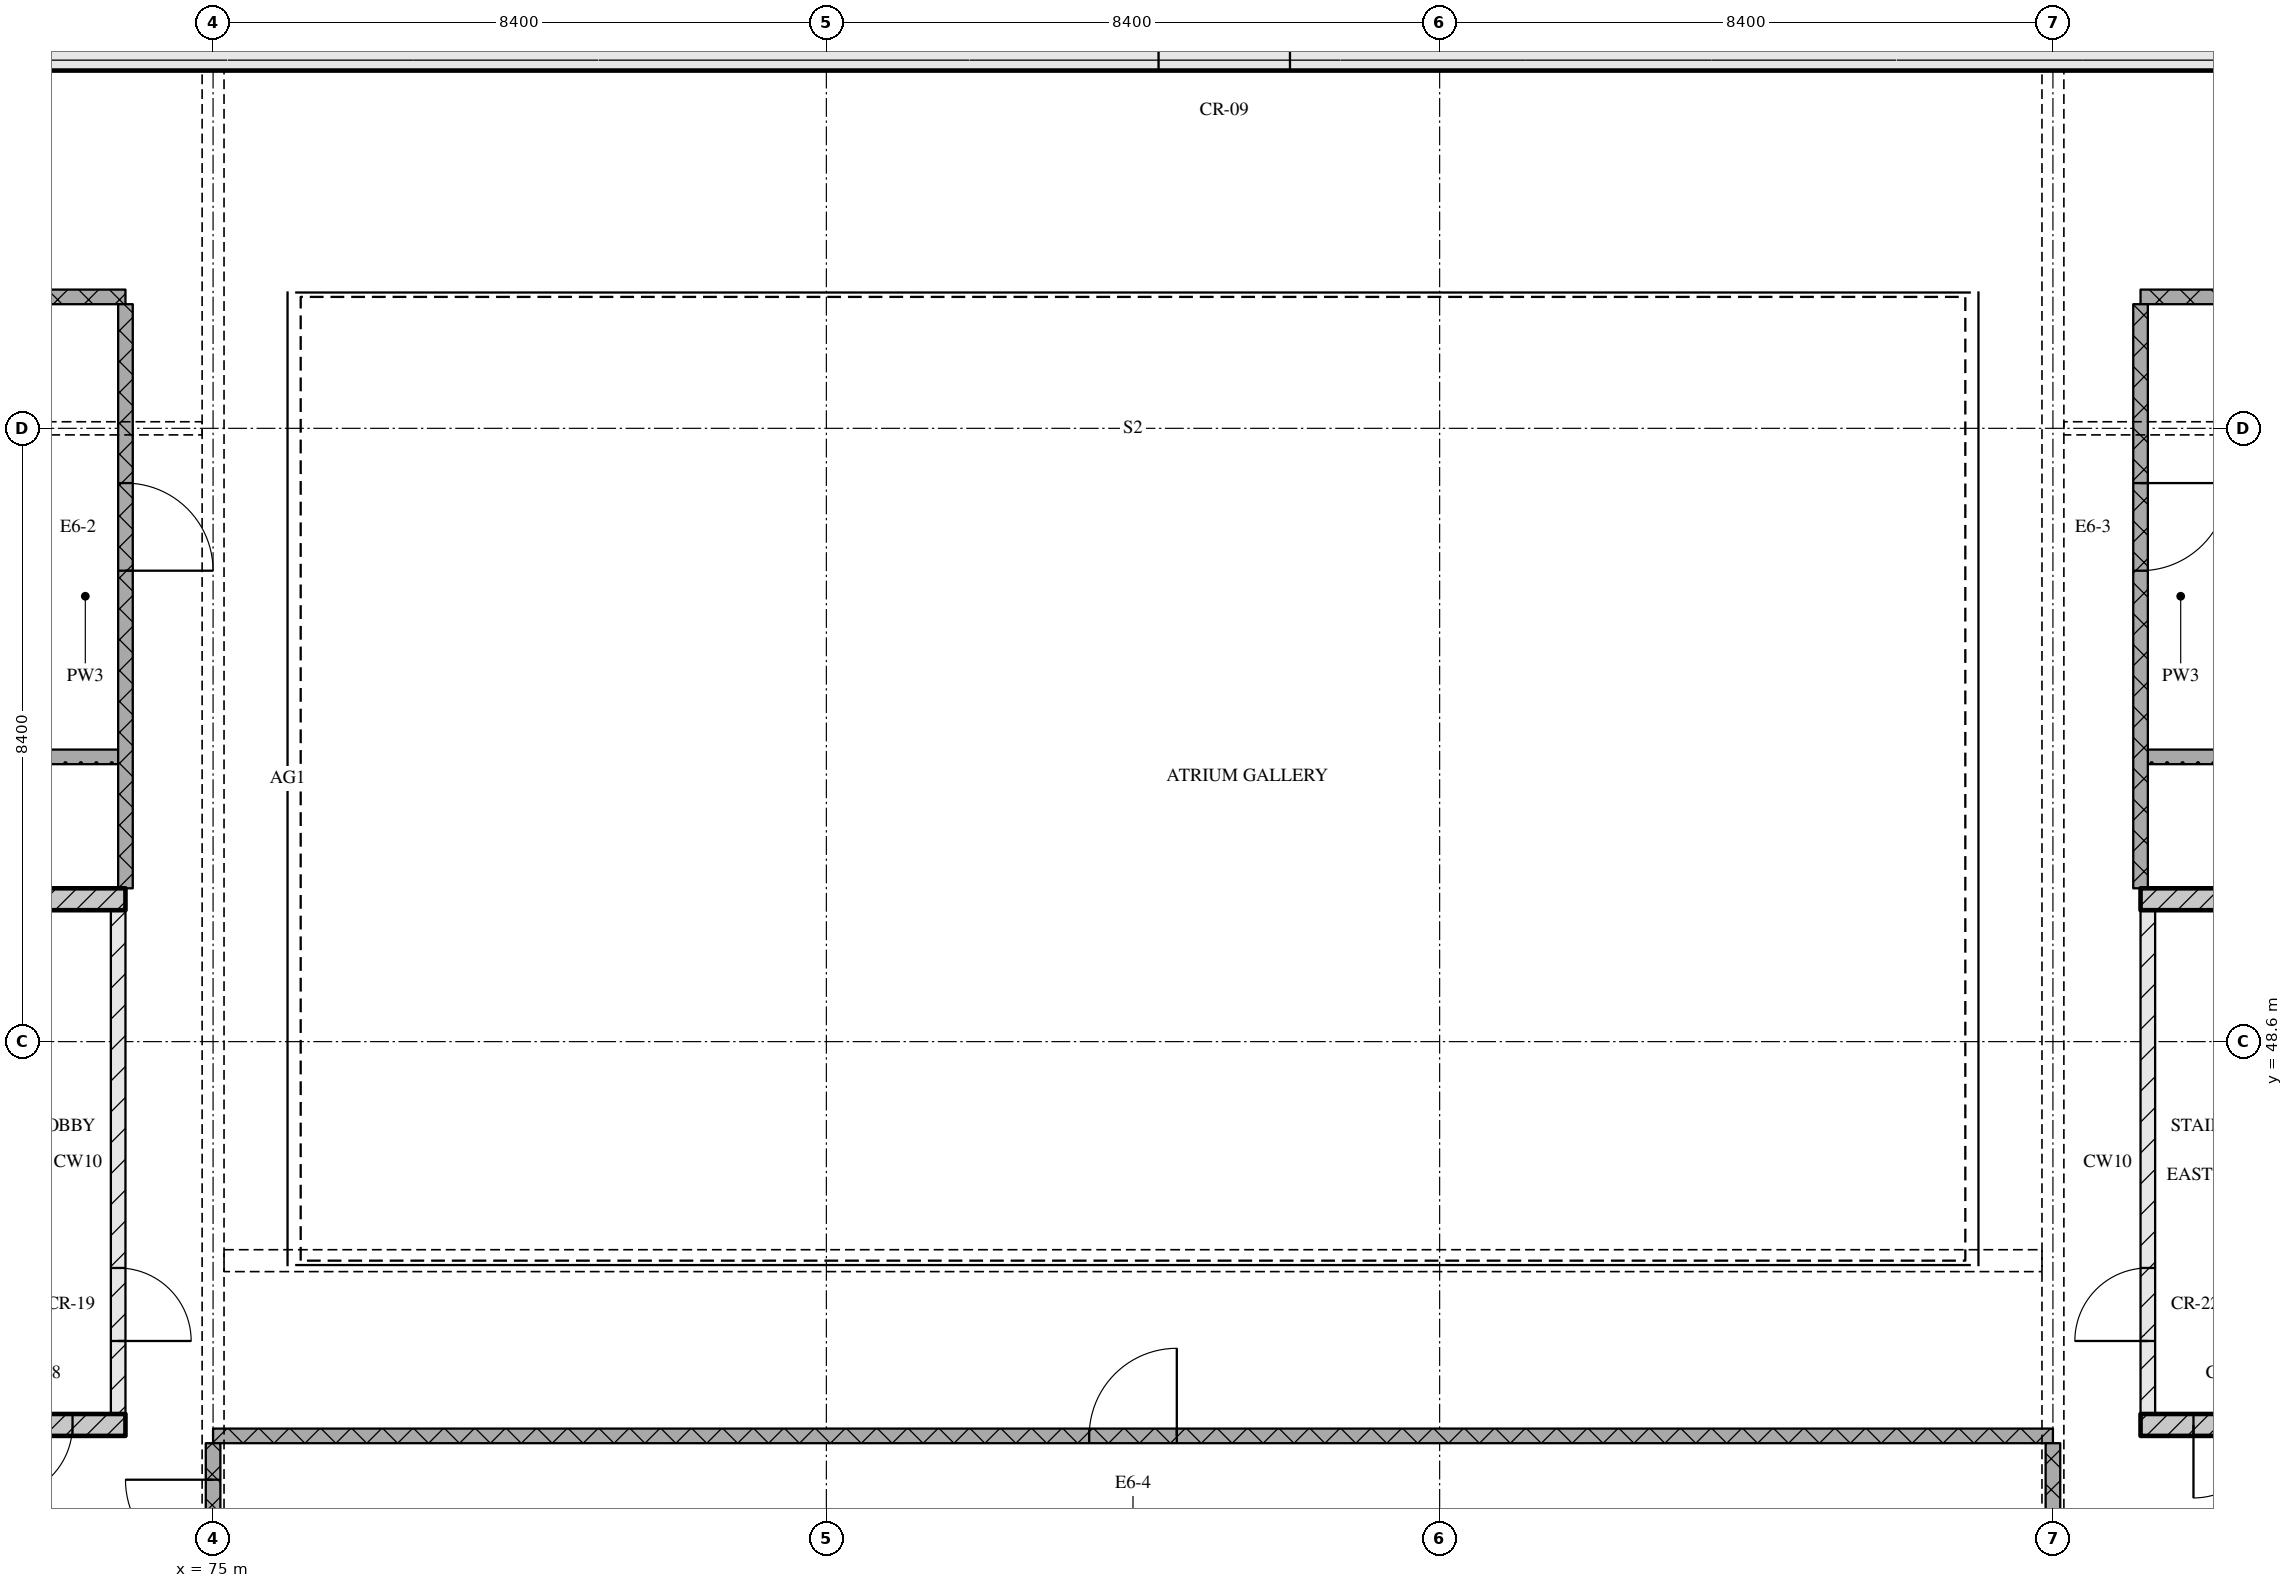
"""IFC4 building model, lengths in metres.
Left out: names, types, materials, properties, quantities, classifications, styles, units other than length and angle.
Written with IfcOpenShell. Run it as: python <this file> out.ifc"""

import sys

from ifc_helpers import new_model, si_unit, direction, frame, frame_2d, origin, place, context, subcontext, project, spatial, rectangle, extrude, element, fill, save


model = new_model("IFC4")
c1 = context("Model", 3, precision=1e-05, world=origin(), true_north=direction((0.0, 1.0)))
c2 = subcontext(c1, "Body", "Model", "MODEL_VIEW")
j1 = project(units=[si_unit("LENGTHUNIT", "METRE"), si_unit("PLANEANGLEUNIT", "RADIAN")], contexts=[c1])
p1 = place(None, origin())
s1 = spatial("IfcSite", under=j1, at=p1, CompositionType="ELEMENT")
p2 = place(p1, origin())
s2 = spatial("IfcBuilding", under=s1, at=p2, CompositionType="ELEMENT")
p3 = place(p2, frame((0.0, 0.0, 303.15)))
s3 = spatial("IfcBuildingStorey", under=s2, at=p3, CompositionType="ELEMENT", Elevation=303.15)
p4 = place(p3, frame((67.3, 62.15, 0.0), z_axis=(0.0, 0.0, 1.0), x_axis=(1.0, 0.0, 0.0)))
e1 = element("IfcWall", 1, at=p4, inside=s3, PredefinedType="SOLIDWALL", context=c2, shape_type="SweptSolid", body=[
    extrude(rectangle(XDim=40.6, YDim=0.5, at=frame_2d((20.3, 0.0))), origin(), (0.0, 0.0, 1.0), 3.32),
])
p5 = place(p4, frame((20.65, 0.0, 0.0)))
e2 = element("IfcOpeningElement", 2, at=p5, cuts=e1, PredefinedType="OPENING", context=c2, shape_type="SweptSolid", body=[
    extrude(rectangle(XDim=1.8, YDim=2.1, at=frame_2d((0.9, 1.05))), frame((0.0, 0.26, 0.0), z_axis=(0.0, -1.0, 0.0), x_axis=(1.0, 0.0, 0.0)), (0.0, 0.0, 1.0), 0.52),
])
p6 = place(p3, frame((68.2, 43.35, 0.0), z_axis=(0.0, 0.0, 1.0), x_axis=(1.0, 0.0, 0.0)))
e3 = element("IfcWall", 3, at=p6, inside=s3, PredefinedType="SOLIDWALL", context=c2, shape_type="SweptSolid", body=[
    extrude(rectangle(XDim=5.6, YDim=0.3, at=frame_2d((2.8, 0.0))), origin(), (0.0, 0.0, 1.0), 3.32),
])
p7 = place(p6, frame((3.875, 0.0, 0.0)))
e4 = element("IfcOpeningElement", 4, at=p7, cuts=e3, PredefinedType="OPENING", context=c2, shape_type="SweptSolid", body=[
    extrude(rectangle(XDim=1.0, YDim=2.1, at=frame_2d((0.5, 1.05))), frame((0.0, 0.16, 0.0), z_axis=(0.0, -1.0, 0.0), x_axis=(1.0, 0.0, 0.0)), (0.0, 0.0, 1.0), 0.32),
])
p8 = place(p3, frame((73.7, 43.5, 0.0), z_axis=(0.0, 0.0, 1.0), x_axis=(0.0, 1.0, 0.0)))
e5 = element("IfcWall", 5, at=p8, inside=s3, PredefinedType="PARTITIONING", context=c2, shape_type="SweptSolid", body=[
    extrude(rectangle(XDim=6.9, YDim=0.2, at=frame_2d((3.45, 0.0))), origin(), (0.0, 0.0, 1.0), 3.32),
])
p9 = place(p8, frame((1.0, 0.0, 0.0)))
e6 = element("IfcOpeningElement", 6, at=p9, cuts=e5, PredefinedType="OPENING", context=c2, shape_type="SweptSolid", body=[
    extrude(rectangle(XDim=1.0, YDim=2.1, at=frame_2d((0.5, 1.05))), frame((0.0, 0.11, 0.0), z_axis=(0.0, -1.0, 0.0), x_axis=(1.0, 0.0, 0.0)), (0.0, 0.0, 1.0), 0.22),
])
p10 = place(p3, frame((68.2, 50.55, 0.0), z_axis=(0.0, 0.0, 1.0), x_axis=(1.0, 0.0, 0.0)))
e7 = element("IfcWall", 7, at=p10, inside=s3, PredefinedType="SOLIDWALL", context=c2, shape_type="SweptSolid", body=[
    extrude(rectangle(XDim=5.6, YDim=0.3, at=frame_2d((2.8, 0.0))), origin(), (0.0, 0.0, 1.0), 3.32),
])
p11 = place(p3, frame((101.4, 43.35, 0.0), z_axis=(0.0, 0.0, 1.0), x_axis=(1.0, 0.0, 0.0)))
e8 = element("IfcWall", 8, at=p11, inside=s3, PredefinedType="SOLIDWALL", context=c2, shape_type="SweptSolid", body=[
    extrude(rectangle(XDim=5.6, YDim=0.3, at=frame_2d((2.8, 0.0))), origin(), (0.0, 0.0, 1.0), 3.32),
])
p12 = place(p11, frame((0.725, 0.0, 0.0)))
e9 = element("IfcOpeningElement", 9, at=p12, cuts=e8, PredefinedType="OPENING", context=c2, shape_type="SweptSolid", body=[
    extrude(rectangle(XDim=1.0, YDim=2.1, at=frame_2d((0.5, 1.05))), frame((0.0, 0.16, 0.0), z_axis=(0.0, -1.0, 0.0), x_axis=(1.0, 0.0, 0.0)), (0.0, 0.0, 1.0), 0.32),
])
p13 = place(p3, frame((101.5, 43.5, 0.0), z_axis=(0.0, 0.0, 1.0), x_axis=(0.0, 1.0, 0.0)))
e10 = element("IfcWall", 10, at=p13, inside=s3, PredefinedType="PARTITIONING", context=c2, shape_type="SweptSolid", body=[
    extrude(rectangle(XDim=6.9, YDim=0.2, at=frame_2d((3.45, 0.0))), origin(), (0.0, 0.0, 1.0), 3.32),
])
p14 = place(p13, frame((1.0, 0.0, 0.0)))
e11 = element("IfcOpeningElement", 11, at=p14, cuts=e10, PredefinedType="OPENING", context=c2, shape_type="SweptSolid", body=[
    extrude(rectangle(XDim=1.0, YDim=2.1, at=frame_2d((0.5, 1.05))), frame((0.0, 0.11, 0.0), z_axis=(0.0, -1.0, 0.0), x_axis=(1.0, 0.0, 0.0)), (0.0, 0.0, 1.0), 0.22),
])
p15 = place(p3, frame((101.4, 50.55, 0.0), z_axis=(0.0, 0.0, 1.0), x_axis=(1.0, 0.0, 0.0)))
e12 = element("IfcWall", 12, at=p15, inside=s3, PredefinedType="SOLIDWALL", context=c2, shape_type="SweptSolid", body=[
    extrude(rectangle(XDim=5.6, YDim=0.3, at=frame_2d((2.8, 0.0))), origin(), (0.0, 0.0, 1.0), 3.32),
])
p16 = place(p3, frame((100.2, 43.2, 0.0), z_axis=(0.0, 0.0, 1.0), x_axis=(-1.0, 0.0, 0.0)))
e13 = element("IfcWall", 13, at=p16, inside=s3, PredefinedType="PARTITIONING", context=c2, shape_type="SweptSolid", body=[
    extrude(rectangle(XDim=25.2, YDim=0.2, at=frame_2d((12.6, 0.0))), origin(), (0.0, 0.0, 1.0), 3.32),
])
p17 = place(p16, frame((12.0, 0.0, 0.0)))
e14 = element("IfcOpeningElement", 14, at=p17, cuts=e13, PredefinedType="OPENING", context=c2, shape_type="SweptSolid", body=[
    extrude(rectangle(XDim=1.2, YDim=2.1, at=frame_2d((0.6, 1.05))), frame((0.0, 0.11, 0.0), z_axis=(0.0, -1.0, 0.0), x_axis=(1.0, 0.0, 0.0)), (0.0, 0.0, 1.0), 0.22),
])
for number, where, z_axis, x_axis in (
    (15, (56.68, 52.5, 0.0), (0.0, 0.0, 1.0), (1.0, 0.0, 0.0)),
    (16, (101.5, 52.5, 0.0), (0.0, 0.0, 1.0), (1.0, 0.0, 0.0)),
):
    element("IfcWall", number, at=place(p3, frame(where, z_axis=z_axis, x_axis=x_axis)), inside=s3, PredefinedType="PARTITIONING", context=c2, shape_type="SweptSolid", body=[
        extrude(rectangle(XDim=17.02, YDim=0.2, at=frame_2d((8.51, 0.0))), origin(), (0.0, 0.0, 1.0), 3.32),
    ])
for number, where, z_axis, x_axis in (
    (17, (64.2, 58.8, 0.0), (0.0, 0.0, 1.0), (1.0, 0.0, 0.0)),
    (18, (101.4, 58.8, 0.0), (0.0, 0.0, 1.0), (1.0, 0.0, 0.0)),
):
    element("IfcWall", number, at=place(p3, frame(where, z_axis=z_axis, x_axis=x_axis)), inside=s3, PredefinedType="PARTITIONING", context=c2, shape_type="SweptSolid", body=[
        extrude(rectangle(XDim=9.6, YDim=0.2, at=frame_2d((4.8, 0.0))), origin(), (0.0, 0.0, 1.0), 3.32),
    ])
p18 = place(p3, frame((73.8, 50.7, 0.0), z_axis=(0.0, 0.0, 1.0), x_axis=(0.0, 1.0, 0.0)))
e19 = element("IfcWall", 19, at=p18, inside=s3, PredefinedType="PARTITIONING", context=c2, shape_type="SweptSolid", body=[
    extrude(rectangle(XDim=8.0, YDim=0.2, at=frame_2d((4.0, 0.0))), origin(), (0.0, 0.0, 1.0), 3.32),
])
p19 = place(p18, frame((4.35, 0.0, 0.0)))
e20 = element("IfcOpeningElement", 20, at=p19, cuts=e19, PredefinedType="OPENING", context=c2, shape_type="SweptSolid", body=[
    extrude(rectangle(XDim=1.2, YDim=2.1, at=frame_2d((0.6, 1.05))), frame((0.0, 0.11, 0.0), z_axis=(0.0, -1.0, 0.0), x_axis=(1.0, 0.0, 0.0)), (0.0, 0.0, 1.0), 0.22),
])
p20 = place(p3, frame((75.0, 43.1, 0.0), z_axis=(0.0, 0.0, 1.0), x_axis=(0.0, -1.0, 0.0)))
e21 = element("IfcWall", 21, at=p20, inside=s3, PredefinedType="PARTITIONING", context=c2, shape_type="SweptSolid", body=[
    extrude(rectangle(XDim=2.2, YDim=0.2, at=frame_2d((1.1, 0.0))), origin(), (0.0, 0.0, 1.0), 2.53),
])
p21 = place(p20, frame((0.5, 0.0, 0.0)))
e22 = element("IfcOpeningElement", 22, at=p21, cuts=e21, PredefinedType="OPENING", context=c2, shape_type="SweptSolid", body=[
    extrude(rectangle(XDim=1.2, YDim=2.1, at=frame_2d((0.6, 1.05))), frame((0.0, 0.11, 0.0), z_axis=(0.0, -1.0, 0.0), x_axis=(1.0, 0.0, 0.0)), (0.0, 0.0, 1.0), 0.22),
])
p22 = place(p3, frame((100.2, 43.1, 0.0), z_axis=(0.0, 0.0, 1.0), x_axis=(0.0, -1.0, 0.0)))
e23 = element("IfcWall", 23, at=p22, inside=s3, PredefinedType="PARTITIONING", context=c2, shape_type="SweptSolid", body=[
    extrude(rectangle(XDim=2.2, YDim=0.2, at=frame_2d((1.1, 0.0))), origin(), (0.0, 0.0, 1.0), 2.53),
])
p23 = place(p3, frame((101.4, 58.7, 0.0), z_axis=(0.0, 0.0, 1.0), x_axis=(0.0, -1.0, 0.0)))
e24 = element("IfcWall", 24, at=p23, inside=s3, PredefinedType="PARTITIONING", context=c2, shape_type="SweptSolid", body=[
    extrude(rectangle(XDim=8.0, YDim=0.2, at=frame_2d((4.0, 0.0))), origin(), (0.0, 0.0, 1.0), 3.32),
])
p24 = place(p23, frame((2.45, 0.0, 0.0)))
e25 = element("IfcOpeningElement", 25, at=p24, cuts=e24, PredefinedType="OPENING", context=c2, shape_type="SweptSolid", body=[
    extrude(rectangle(XDim=1.2, YDim=2.1, at=frame_2d((0.6, 1.05))), frame((0.0, 0.11, 0.0), z_axis=(0.0, -1.0, 0.0), x_axis=(1.0, 0.0, 0.0)), (0.0, 0.0, 1.0), 0.22),
])
p25 = place(p5, origin())
e26 = element("IfcDoor", 26, at=p25, inside=s3, OperationType="DOUBLE_DOOR_SINGLE_SWING", PredefinedType="DOOR", context=c2, shape_type="SweptSolid", body=[
    extrude(rectangle(XDim=1.8, YDim=2.1, at=frame_2d((0.9, 1.05))), frame((0.0, 0.025, 0.0), z_axis=(0.0, -1.0, 0.0), x_axis=(1.0, 0.0, 0.0)), (0.0, 0.0, 1.0), 0.05),
])
fill(e2, e26)
p26 = place(p7, origin())
e27 = element("IfcDoor", 27, at=p26, inside=s3, OperationType="SINGLE_SWING_RIGHT", PredefinedType="DOOR", context=c2, shape_type="SweptSolid", body=[
    extrude(rectangle(XDim=1.0, YDim=2.1, at=frame_2d((0.5, 1.05))), frame((0.0, 0.025, 0.0), z_axis=(0.0, -1.0, 0.0), x_axis=(1.0, 0.0, 0.0)), (0.0, 0.0, 1.0), 0.05),
])
fill(e4, e27)
p27 = place(p9, origin())
e28 = element("IfcDoor", 28, at=p27, inside=s3, OperationType="SINGLE_SWING_RIGHT", PredefinedType="DOOR", context=c2, shape_type="SweptSolid", body=[
    extrude(rectangle(XDim=1.0, YDim=2.1, at=frame_2d((0.5, 1.05))), frame((0.0, 0.025, 0.0), z_axis=(0.0, -1.0, 0.0), x_axis=(1.0, 0.0, 0.0)), (0.0, 0.0, 1.0), 0.05),
])
fill(e6, e28)
p28 = place(p12, origin())
e29 = element("IfcDoor", 29, at=p28, inside=s3, OperationType="SINGLE_SWING_RIGHT", PredefinedType="DOOR", context=c2, shape_type="SweptSolid", body=[
    extrude(rectangle(XDim=1.0, YDim=2.1, at=frame_2d((0.5, 1.05))), frame((0.0, 0.025, 0.0), z_axis=(0.0, -1.0, 0.0), x_axis=(1.0, 0.0, 0.0)), (0.0, 0.0, 1.0), 0.05),
])
fill(e9, e29)
p29 = place(p14, origin())
e30 = element("IfcDoor", 30, at=p29, inside=s3, OperationType="SINGLE_SWING_LEFT", PredefinedType="DOOR", context=c2, shape_type="SweptSolid", body=[
    extrude(rectangle(XDim=1.0, YDim=2.1, at=frame_2d((0.5, 1.05))), frame((0.0, 0.025, 0.0), z_axis=(0.0, -1.0, 0.0), x_axis=(1.0, 0.0, 0.0)), (0.0, 0.0, 1.0), 0.05),
])
fill(e11, e30)
p30 = place(p17, origin())
e31 = element("IfcDoor", 31, at=p30, inside=s3, OperationType="SINGLE_SWING_RIGHT", PredefinedType="DOOR", context=c2, shape_type="SweptSolid", body=[
    extrude(rectangle(XDim=1.2, YDim=2.1, at=frame_2d((0.6, 1.05))), frame((0.0, 0.025, 0.0), z_axis=(0.0, -1.0, 0.0), x_axis=(1.0, 0.0, 0.0)), (0.0, 0.0, 1.0), 0.05),
])
fill(e14, e31)
p31 = place(p19, origin())
e32 = element("IfcDoor", 32, at=p31, inside=s3, OperationType="SINGLE_SWING_RIGHT", PredefinedType="DOOR", context=c2, shape_type="SweptSolid", body=[
    extrude(rectangle(XDim=1.2, YDim=2.1, at=frame_2d((0.6, 1.05))), frame((0.0, 0.025, 0.0), z_axis=(0.0, -1.0, 0.0), x_axis=(1.0, 0.0, 0.0)), (0.0, 0.0, 1.0), 0.05),
])
fill(e20, e32)
p32 = place(p21, origin())
e33 = element("IfcDoor", 33, at=p32, inside=s3, OperationType="SINGLE_SWING_RIGHT", PredefinedType="DOOR", context=c2, shape_type="SweptSolid", body=[
    extrude(rectangle(XDim=1.2, YDim=2.1, at=frame_2d((0.6, 1.05))), frame((0.0, 0.025, 0.0), z_axis=(0.0, -1.0, 0.0), x_axis=(1.0, 0.0, 0.0)), (0.0, 0.0, 1.0), 0.05),
])
fill(e22, e33)
p33 = place(p24, origin())
e34 = element("IfcDoor", 34, at=p33, inside=s3, OperationType="SINGLE_SWING_LEFT", PredefinedType="DOOR", context=c2, shape_type="SweptSolid", body=[
    extrude(rectangle(XDim=1.2, YDim=2.1, at=frame_2d((0.6, 1.05))), frame((0.0, 0.025, 0.0), z_axis=(0.0, -1.0, 0.0), x_axis=(1.0, 0.0, 0.0)), (0.0, 0.0, 1.0), 0.05),
])
fill(e25, e34)
save(model, sys.argv[1])
